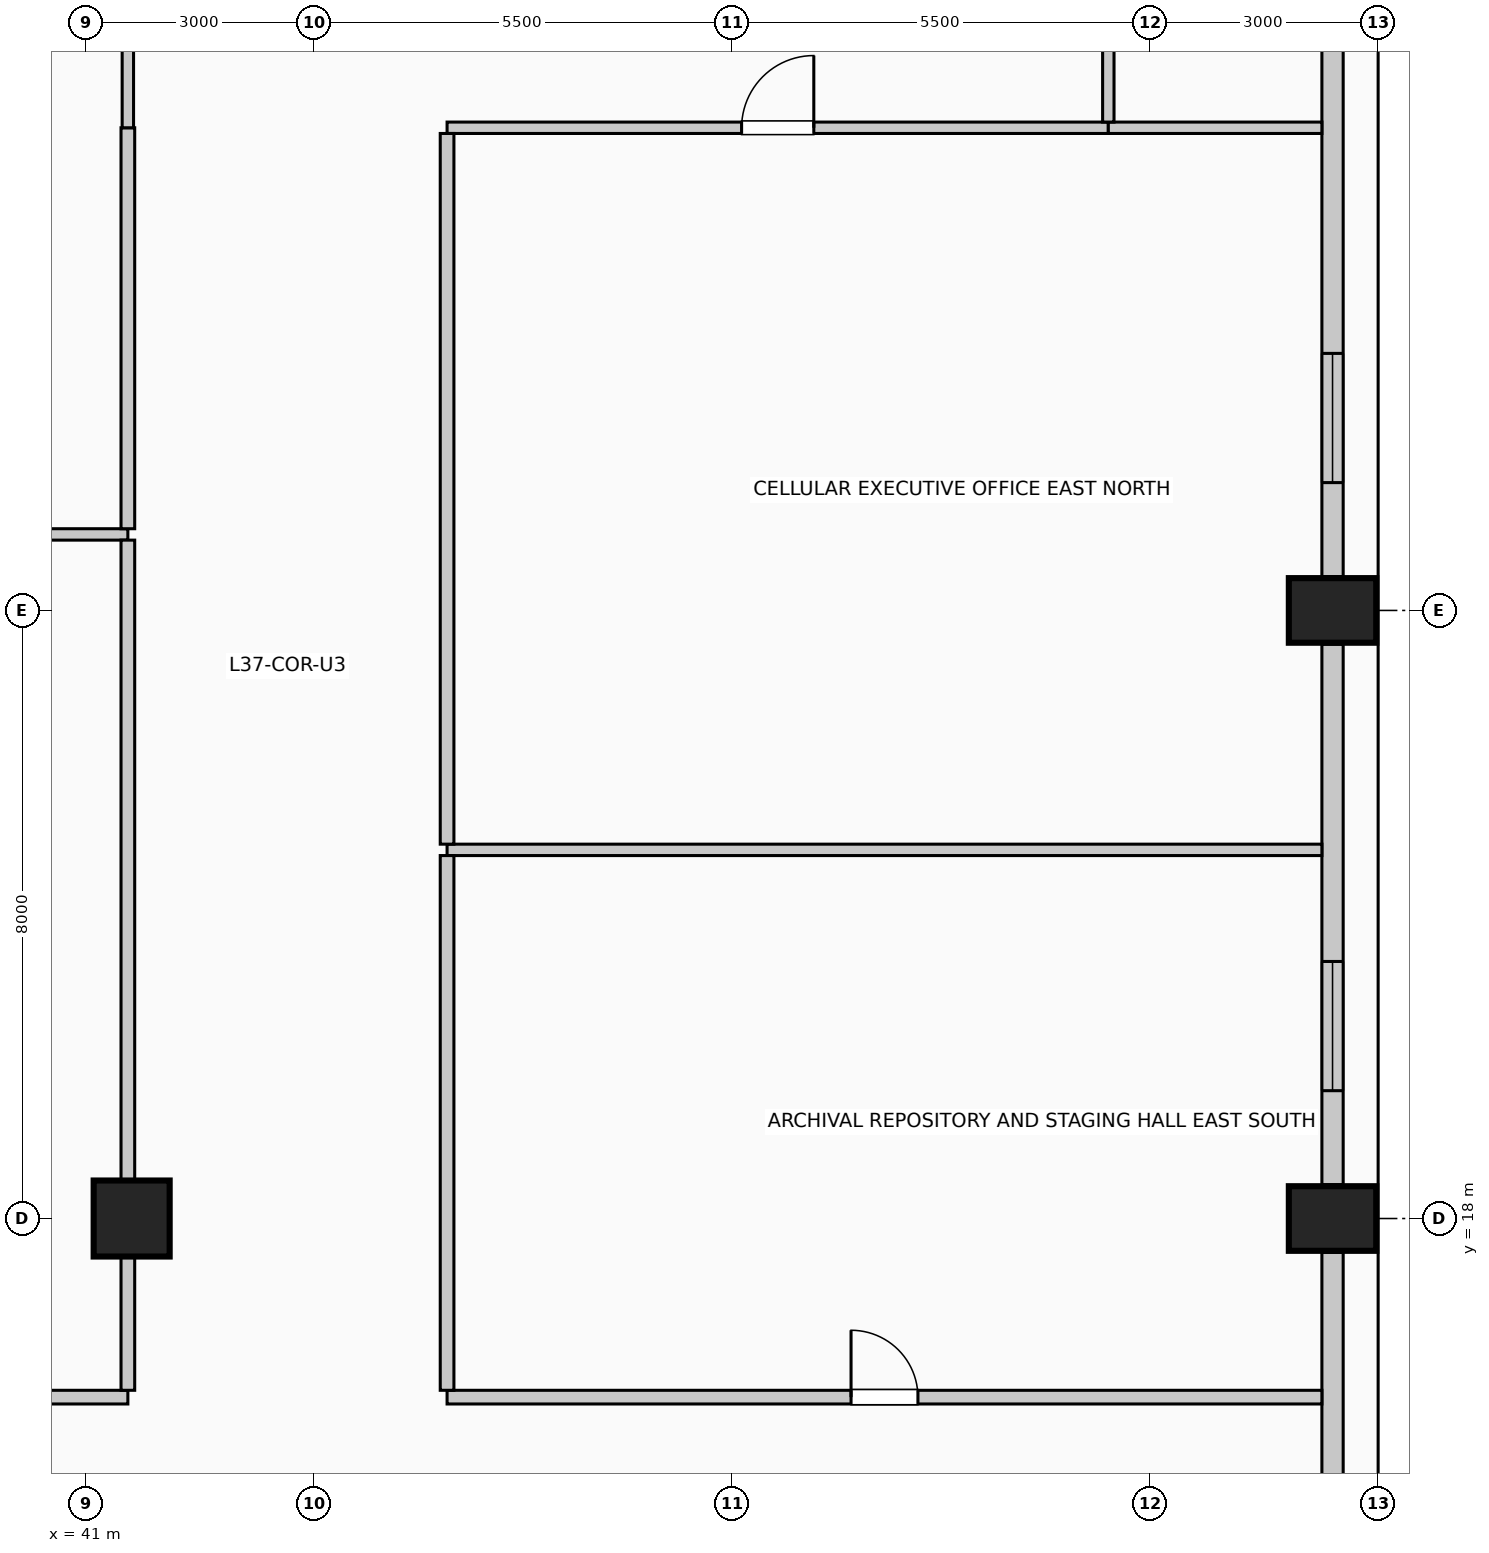
"""IFC4 building model, lengths in metres.
Left out: names, types, materials, properties, quantities, classifications, styles, units other than length and angle.
Written with IfcOpenShell. Run it as: python <this file> out.ifc"""

import sys

from ifc_helpers import new_model, si_unit, direction, frame, frame_2d, origin, origin_2d, place, context, subcontext, project, spatial, rectangle, circle, extrude, element, fill, save


model = new_model("IFC4")
c1 = context("Model", 3, precision=1e-05, world=origin(), true_north=direction((0.0, 1.0)))
c2 = subcontext(c1, "Body", "Model", "MODEL_VIEW")
j1 = project(units=[si_unit("LENGTHUNIT", "METRE"), si_unit("PLANEANGLEUNIT", "RADIAN")], contexts=[c1])
p1 = place(None, origin())
s1 = spatial("IfcSite", under=j1, at=p1, CompositionType="ELEMENT")
p2 = place(p1, origin())
s2 = spatial("IfcBuilding", under=s1, at=p2, CompositionType="ELEMENT")
p3 = place(p2, frame((0.0, 0.0, 152.6)))
s3 = spatial("IfcBuildingStorey", under=s2, at=p3, CompositionType="ELEMENT", Elevation=152.6)
for number, where, z_axis, x_axis in (
    (1, (57.4, 18.0, 0.0), (0.0, 0.0, 1.0), (0.0, 1.0, 0.0)),
    (2, (57.4, 26.0, 0.0), (0.0, 0.0, 1.0), (0.0, 1.0, 0.0)),
):
    element("IfcColumn", number, at=place(p3, frame(where, z_axis=z_axis, x_axis=x_axis)), inside=s3, PredefinedType="COLUMN", context=c2, shape_type="SweptSolid", body=[
        extrude(rectangle(XDim=0.85, YDim=1.15, at=origin_2d()), origin(), (0.0, 0.0, 1.0), 4.0),
    ])
p4 = place(p3, frame((41.6, 18.0, 0.0), z_axis=(0.0, 0.0, 1.0), x_axis=(1.0, 0.0, 0.0)))
e3 = element("IfcColumn", 3, at=p4, inside=s3, PredefinedType="COLUMN", context=c2, shape_type="SweptSolid", body=[
    extrude(circle(Radius=0.5, at=origin_2d()), origin(), (0.0, 0.0, 1.0), 4.0),
])
p5 = place(p3, frame((57.4, 17.555, 0.0), z_axis=(0.0, 0.0, 1.0), x_axis=(0.0, -1.0, 0.0)))
e4 = element("IfcWall", 4, at=p5, inside=s3, PredefinedType="SOLIDWALL", context=c2, shape_type="SweptSolid", body=[
    extrude(rectangle(XDim=7.11, YDim=0.28, at=frame_2d((3.555, 0.0))), origin(), (0.0, 0.0, 1.0), 2.875),
])
p6 = place(p3, frame((57.4, 25.555, 0.0), z_axis=(0.0, 0.0, 1.0), x_axis=(0.0, -1.0, 0.0)))
e5 = element("IfcWall", 5, at=p6, inside=s3, PredefinedType="SOLIDWALL", context=c2, shape_type="SweptSolid", body=[
    extrude(rectangle(XDim=7.11, YDim=0.28, at=frame_2d((3.555, 0.0))), origin(), (0.0, 0.0, 1.0), 2.875),
])
p7 = place(p6, frame((4.173, 0.0, 0.5)))
e6 = element("IfcOpeningElement", 6, at=p7, cuts=e5, PredefinedType="OPENING", context=c2, shape_type="SweptSolid", body=[
    extrude(rectangle(XDim=1.7, YDim=1.95, at=frame_2d((0.85, 0.975))), frame((0.0, 0.15, 0.0), z_axis=(0.0, -1.0, 0.0), x_axis=(1.0, 0.0, 0.0)), (0.0, 0.0, 1.0), 0.3),
])
p8 = place(p3, frame((57.4, 33.555, 0.0), z_axis=(0.0, 0.0, 1.0), x_axis=(0.0, -1.0, 0.0)))
e7 = element("IfcWall", 7, at=p8, inside=s3, PredefinedType="SOLIDWALL", context=c2, shape_type="SweptSolid", body=[
    extrude(rectangle(XDim=7.11, YDim=0.28, at=frame_2d((3.555, 0.0))), origin(), (0.0, 0.0, 1.0), 2.875),
])
p9 = place(p8, frame((4.173, 0.0, 0.5)))
e8 = element("IfcOpeningElement", 8, at=p9, cuts=e7, PredefinedType="OPENING", context=c2, shape_type="SweptSolid", body=[
    extrude(rectangle(XDim=1.7, YDim=1.95, at=frame_2d((0.85, 0.975))), frame((0.0, 0.15, 0.0), z_axis=(0.0, -1.0, 0.0), x_axis=(1.0, 0.0, 0.0)), (0.0, 0.0, 1.0), 0.3),
])
p10 = place(p3, frame((37.9, 15.65, 0.0), z_axis=(0.0, 0.0, 1.0), x_axis=(1.0, 0.0, 0.0)))
e9 = element("IfcWall", 9, at=p10, inside=s3, PredefinedType="PARTITIONING", context=c2, shape_type="SweptSolid", body=[
    extrude(rectangle(XDim=3.65, YDim=0.18, at=frame_2d((1.825, 0.0))), origin(), (0.0, 0.0, 1.0), 3.725),
])
p11 = place(p10, frame((1.385, 0.0, 0.0)))
e10 = element("IfcOpeningElement", 10, at=p11, cuts=e9, PredefinedType="OPENING", context=c2, shape_type="SweptSolid", body=[
    extrude(rectangle(XDim=0.88, YDim=2.1, at=frame_2d((0.44, 1.05))), frame((0.0, 0.1, 0.0), z_axis=(0.0, -1.0, 0.0), x_axis=(1.0, 0.0, 0.0)), (0.0, 0.0, 1.0), 0.2),
])
p12 = place(p3, frame((45.75, 15.65, 0.0), z_axis=(0.0, 0.0, 1.0), x_axis=(1.0, 0.0, 0.0)))
e11 = element("IfcWall", 11, at=p12, inside=s3, PredefinedType="PARTITIONING", context=c2, shape_type="SweptSolid", body=[
    extrude(rectangle(XDim=11.51, YDim=0.18, at=frame_2d((5.755, 0.0))), origin(), (0.0, 0.0, 1.0), 3.725),
])
p13 = place(p12, frame((5.315, 0.0, 0.0)))
e12 = element("IfcOpeningElement", 12, at=p13, cuts=e11, PredefinedType="OPENING", context=c2, shape_type="SweptSolid", body=[
    extrude(rectangle(XDim=0.88, YDim=2.1, at=frame_2d((0.44, 1.05))), frame((0.0, 0.1, 0.0), z_axis=(0.0, -1.0, 0.0), x_axis=(1.0, 0.0, 0.0)), (0.0, 0.0, 1.0), 0.2),
])
p14 = place(p3, frame((45.75, 22.85, 0.0), z_axis=(0.0, 0.0, 1.0), x_axis=(1.0, 0.0, 0.0)))
e13 = element("IfcWall", 13, at=p14, inside=s3, PredefinedType="PARTITIONING", context=c2, shape_type="SweptSolid", body=[
    extrude(rectangle(XDim=11.51, YDim=0.15, at=frame_2d((5.755, 0.0))), origin(), (0.0, 0.0, 1.0), 3.725),
])
p15 = place(p3, frame((37.9, 27.0, 0.0), z_axis=(0.0, 0.0, 1.0), x_axis=(1.0, 0.0, 0.0)))
e14 = element("IfcWall", 14, at=p15, inside=s3, PredefinedType="PARTITIONING", context=c2, shape_type="SweptSolid", body=[
    extrude(rectangle(XDim=3.65, YDim=0.15, at=frame_2d((1.825, 0.0))), origin(), (0.0, 0.0, 1.0), 3.725),
])
p16 = place(p3, frame((45.75, 32.35, 0.0), z_axis=(0.0, 0.0, 1.0), x_axis=(1.0, 0.0, 0.0)))
e15 = element("IfcWall", 15, at=p16, inside=s3, PredefinedType="PARTITIONING", context=c2, shape_type="SweptSolid", body=[
    extrude(rectangle(XDim=8.7, YDim=0.15, at=frame_2d((4.35, 0.0))), origin(), (0.0, 0.0, 1.0), 3.725),
])
p17 = place(p16, frame((3.875, 0.0, 0.0)))
e16 = element("IfcOpeningElement", 16, at=p17, cuts=e15, PredefinedType="OPENING", context=c2, shape_type="SweptSolid", body=[
    extrude(rectangle(XDim=0.95, YDim=2.15, at=frame_2d((0.475, 1.075))), frame((0.0, 0.085, 0.0), z_axis=(0.0, -1.0, 0.0), x_axis=(1.0, 0.0, 0.0)), (0.0, 0.0, 1.0), 0.17),
])
p18 = place(p3, frame((54.45, 32.35, 0.0), z_axis=(0.0, 0.0, 1.0), x_axis=(1.0, 0.0, 0.0)))
e17 = element("IfcWall", 17, at=p18, inside=s3, PredefinedType="PARTITIONING", context=c2, shape_type="SweptSolid", body=[
    extrude(rectangle(XDim=2.81, YDim=0.15, at=frame_2d((1.405, 0.0))), origin(), (0.0, 0.0, 1.0), 3.725),
])
p19 = place(p3, frame((41.55, 15.74, 0.0), z_axis=(0.0, 0.0, 1.0), x_axis=(0.0, 1.0, 0.0)))
e18 = element("IfcWall", 18, at=p19, inside=s3, PredefinedType="PARTITIONING", context=c2, shape_type="SweptSolid", body=[
    extrude(rectangle(XDim=1.76, YDim=0.18, at=frame_2d((0.88, 0.0))), origin(), (0.0, 0.0, 1.0), 3.07),
])
p20 = place(p3, frame((41.55, 18.5, 0.0), z_axis=(0.0, 0.0, 1.0), x_axis=(0.0, 1.0, 0.0)))
e19 = element("IfcWall", 19, at=p20, inside=s3, PredefinedType="PARTITIONING", context=c2, shape_type="SweptSolid", body=[
    extrude(rectangle(XDim=8.425, YDim=0.18, at=frame_2d((4.212, 0.0))), origin(), (0.0, 0.0, 1.0), 3.07),
])
p21 = place(p3, frame((41.55, 27.075, 0.0), z_axis=(0.0, 0.0, 1.0), x_axis=(0.0, 1.0, 0.0)))
e20 = element("IfcWall", 20, at=p21, inside=s3, PredefinedType="PARTITIONING", context=c2, shape_type="SweptSolid", body=[
    extrude(rectangle(XDim=5.275, YDim=0.18, at=frame_2d((2.638, 0.0))), origin(), (0.0, 0.0, 1.0), 3.07),
])
p22 = place(p3, frame((41.55, 32.35, 0.0), z_axis=(0.0, 0.0, 1.0), x_axis=(0.0, 1.0, 0.0)))
e21 = element("IfcWall", 21, at=p22, inside=s3, PredefinedType="PARTITIONING", context=c2, shape_type="SweptSolid", body=[
    extrude(rectangle(XDim=1.15, YDim=0.15, at=frame_2d((0.575, 0.0))), origin(), (0.0, 0.0, 1.0), 3.07),
])
p23 = place(p3, frame((45.75, 15.74, 0.0), z_axis=(0.0, 0.0, 1.0), x_axis=(0.0, 1.0, 0.0)))
e22 = element("IfcWall", 22, at=p23, inside=s3, PredefinedType="PARTITIONING", context=c2, shape_type="SweptSolid", body=[
    extrude(rectangle(XDim=7.035, YDim=0.18, at=frame_2d((3.518, 0.0))), origin(), (0.0, 0.0, 1.0), 3.725),
])
p24 = place(p3, frame((45.75, 22.925, 0.0), z_axis=(0.0, 0.0, 1.0), x_axis=(0.0, 1.0, 0.0)))
e23 = element("IfcWall", 23, at=p24, inside=s3, PredefinedType="PARTITIONING", context=c2, shape_type="SweptSolid", body=[
    extrude(rectangle(XDim=9.35, YDim=0.18, at=frame_2d((4.675, 0.0))), origin(), (0.0, 0.0, 1.0), 3.725),
])
p25 = place(p3, frame((54.45, 32.425, 0.0), z_axis=(0.0, 0.0, 1.0), x_axis=(0.0, 1.0, 0.0)))
e24 = element("IfcWall", 24, at=p25, inside=s3, PredefinedType="PARTITIONING", context=c2, shape_type="SweptSolid", body=[
    extrude(rectangle(XDim=1.725, YDim=0.15, at=frame_2d((0.862, 0.0))), origin(), (0.0, 0.0, 1.0), 3.725),
])
p26 = place(p7, origin())
e25 = element("IfcWindow", 25, at=p26, inside=s3, PartitioningType="SINGLE_PANEL", PredefinedType="WINDOW", context=c2, shape_type="SweptSolid", body=[
    extrude(rectangle(XDim=1.7, YDim=1.95, at=frame_2d((0.85, 0.975))), frame((0.0, 0.03, 0.0), z_axis=(0.0, -1.0, 0.0), x_axis=(1.0, 0.0, 0.0)), (0.0, 0.0, 1.0), 0.06),
])
fill(e6, e25)
p27 = place(p9, origin())
e26 = element("IfcWindow", 26, at=p27, inside=s3, PartitioningType="SINGLE_PANEL", PredefinedType="WINDOW", context=c2, shape_type="SweptSolid", body=[
    extrude(rectangle(XDim=1.7, YDim=1.95, at=frame_2d((0.85, 0.975))), frame((0.0, 0.03, 0.0), z_axis=(0.0, -1.0, 0.0), x_axis=(1.0, 0.0, 0.0)), (0.0, 0.0, 1.0), 0.06),
])
fill(e8, e26)
p28 = place(p13, origin())
e27 = element("IfcDoor", 27, at=p28, inside=s3, OperationType="SINGLE_SWING_LEFT", PredefinedType="DOOR", context=c2, shape_type="SweptSolid", body=[
    extrude(rectangle(XDim=0.88, YDim=2.1, at=frame_2d((0.44, 1.05))), frame((0.0, 0.025, 0.0), z_axis=(0.0, -1.0, 0.0), x_axis=(1.0, 0.0, 0.0)), (0.0, 0.0, 1.0), 0.05),
])
fill(e12, e27)
p29 = place(p17, origin())
e28 = element("IfcDoor", 28, at=p29, inside=s3, OperationType="SINGLE_SWING_RIGHT", PredefinedType="DOOR", context=c2, shape_type="SweptSolid", body=[
    extrude(rectangle(XDim=0.95, YDim=2.15, at=frame_2d((0.475, 1.075))), frame((0.0, 0.025, 0.0), z_axis=(0.0, -1.0, 0.0), x_axis=(1.0, 0.0, 0.0)), (0.0, 0.0, 1.0), 0.05),
])
fill(e16, e28)
save(model, sys.argv[1])
